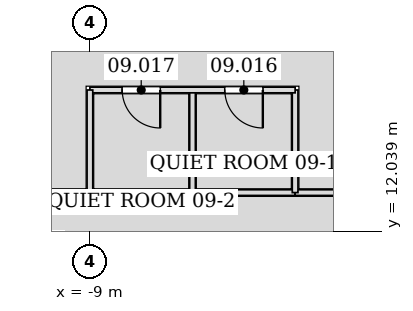
"""IFC4 building model, lengths in metres.
Left out: names, types, materials, properties, quantities, classifications, styles, units other than length and angle.
Written with IfcOpenShell. Run it as: python <this file> out.ifc"""

import sys

from ifc_helpers import new_model, si_unit, direction, frame, frame_2d, origin, place, context, subcontext, project, spatial, rectangle, extrude, element, fill, save


model = new_model("IFC4")
c1 = context("Model", 3, precision=1e-05, world=origin(), true_north=direction((0.0, 1.0)))
c2 = subcontext(c1, "Body", "Model", "MODEL_VIEW")
j1 = project(units=[si_unit("LENGTHUNIT", "METRE"), si_unit("PLANEANGLEUNIT", "RADIAN")], contexts=[c1])
p1 = place(None, origin())
s1 = spatial("IfcSite", under=j1, at=p1, CompositionType="ELEMENT")
p2 = place(p1, origin())
s2 = spatial("IfcBuilding", under=s1, at=p2, CompositionType="ELEMENT")
p3 = place(p2, frame((0.0, 0.0, 45.6)))
s3 = spatial("IfcBuildingStorey", under=s2, at=p3, CompositionType="ELEMENT", Elevation=45.6)
for number, where, z_axis, x_axis in (
    (1, (-3.599, 13.05, 0.0), (0.0, 0.0, 1.0), (-1.0, 0.0, 0.0)),
    (2, (-6.299, 13.05, 0.0), (0.0, 0.0, 1.0), (-1.0, 0.0, 0.0)),
):
    element("IfcWall", number, at=place(p3, frame(where, z_axis=z_axis, x_axis=x_axis)), inside=s3, PredefinedType="PARTITIONING", context=c2, shape_type="SweptSolid", body=[
        extrude(rectangle(XDim=2.702, YDim=0.15, at=frame_2d((1.351, 0.0))), origin(), (0.0, 0.0, 1.0), 4.035),
    ])
p4 = place(p3, frame((-8.999, 13.05, 0.0), z_axis=(0.0, 0.0, 1.0), x_axis=(-1.0, 0.0, 0.0)))
e3 = element("IfcWall", 3, at=p4, inside=s3, PredefinedType="PARTITIONING", context=c2, shape_type="SweptSolid", body=[
    extrude(rectangle(XDim=4.051, YDim=0.15, at=frame_2d((2.025, 0.0))), origin(), (0.0, 0.0, 1.0), 3.014),
])
p5 = place(p3, frame((13.05, 13.05, 0.0), z_axis=(0.0, 0.0, 1.0), x_axis=(-1.0, 0.0, 0.0)))
e4 = element("IfcWall", 4, at=p5, inside=s3, PredefinedType="PARTITIONING", context=c2, shape_type="SweptSolid", body=[
    extrude(rectangle(XDim=16.651, YDim=0.15, at=frame_2d((8.326, 0.0))), origin(), (0.0, 0.0, 1.0), 2.983),
])
p6 = place(p5, frame((7.426, 0.0, 0.0)))
e5 = element("IfcOpeningElement", 5, at=p6, cuts=e4, PredefinedType="OPENING", context=c2, shape_type="SweptSolid", body=[
    extrude(rectangle(XDim=1.8, YDim=2.4, at=frame_2d((0.9, 1.2))), frame((0.0, 0.085, 0.0), z_axis=(0.0, -1.0, 0.0), x_axis=(1.0, 0.0, 0.0)), (0.0, 0.0, 1.0), 0.17),
])
for number, where, z_axis, x_axis in (
    (6, (-6.3, 15.75, 0.0), (0.0, 0.0, 1.0), (0.0, -1.0, 0.0)),
    (7, (-3.6, 13.05, 0.0), (0.0, 0.0, 1.0), (0.0, 1.0, 0.0)),
):
    element("IfcWall", number, at=place(p3, frame(where, z_axis=z_axis, x_axis=x_axis)), inside=s3, PredefinedType="PARTITIONING", context=c2, shape_type="SweptSolid", body=[
        extrude(rectangle(XDim=2.7, YDim=0.15, at=frame_2d((1.35, 0.0))), origin(), (0.0, 0.0, 1.0), 3.426),
    ])
p7 = place(p3, frame((-3.6, 15.75, 0.0), z_axis=(0.0, 0.0, 1.0), x_axis=(-1.0, 0.0, 0.0)))
e8 = element("IfcWall", 8, at=p7, inside=s3, PredefinedType="PARTITIONING", context=c2, shape_type="SweptSolid", body=[
    extrude(rectangle(XDim=5.4, YDim=0.15, at=frame_2d((2.7, 0.0))), origin(), (0.0, 0.0, 1.0), 3.497),
])
p8 = place(p7, frame((0.85, 0.0, 0.0)))
e9 = element("IfcOpeningElement", 9, at=p8, cuts=e8, PredefinedType="OPENING", context=c2, shape_type="SweptSolid", body=[
    extrude(rectangle(XDim=1.0, YDim=2.1, at=frame_2d((0.5, 1.05))), frame((0.0, 0.085, 0.0), z_axis=(0.0, -1.0, 0.0), x_axis=(1.0, 0.0, 0.0)), (0.0, 0.0, 1.0), 0.17),
])
p9 = place(p7, frame((3.55, 0.0, 0.0)))
e10 = element("IfcOpeningElement", 10, at=p9, cuts=e8, PredefinedType="OPENING", context=c2, shape_type="SweptSolid", body=[
    extrude(rectangle(XDim=1.0, YDim=2.1, at=frame_2d((0.5, 1.05))), frame((0.0, 0.085, 0.0), z_axis=(0.0, -1.0, 0.0), x_axis=(1.0, 0.0, 0.0)), (0.0, 0.0, 1.0), 0.17),
])
p10 = place(p3, frame((-9.0, 15.75, 0.0), z_axis=(0.0, 0.0, 1.0), x_axis=(0.0, -1.0, 0.0)))
e11 = element("IfcWall", 11, at=p10, inside=s3, PredefinedType="PARTITIONING", context=c2, shape_type="SweptSolid", body=[
    extrude(rectangle(XDim=2.7, YDim=0.15, at=frame_2d((1.35, 0.0))), origin(), (0.0, 0.0, 1.0), 3.426),
])
p11 = place(p8, origin())
e12 = element("IfcDoor", 12, at=p11, inside=s3, OperationType="SINGLE_SWING_LEFT", PredefinedType="DOOR", context=c2, shape_type="SweptSolid", body=[
    extrude(rectangle(XDim=1.0, YDim=2.1, at=frame_2d((0.5, 1.05))), frame((0.0, 0.025, 0.0), z_axis=(0.0, -1.0, 0.0), x_axis=(1.0, 0.0, 0.0)), (0.0, 0.0, 1.0), 0.05),
])
fill(e9, e12)
p12 = place(p9, origin())
e13 = element("IfcDoor", 13, at=p12, inside=s3, OperationType="SINGLE_SWING_LEFT", PredefinedType="DOOR", context=c2, shape_type="SweptSolid", body=[
    extrude(rectangle(XDim=1.0, YDim=2.1, at=frame_2d((0.5, 1.05))), frame((0.0, 0.025, 0.0), z_axis=(0.0, -1.0, 0.0), x_axis=(1.0, 0.0, 0.0)), (0.0, 0.0, 1.0), 0.05),
])
fill(e10, e13)
save(model, sys.argv[1])
